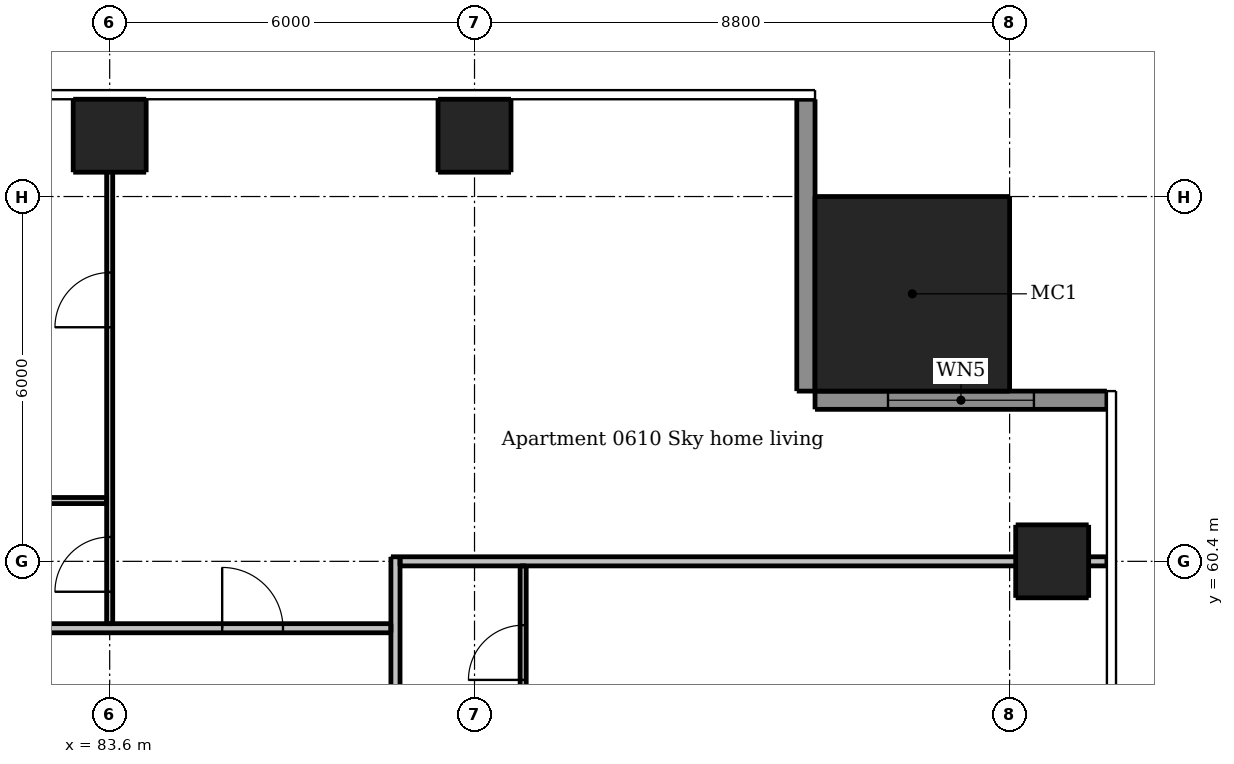
"""IFC4 building model, lengths in metres.
Left out: names, types, materials, properties, quantities, classifications, styles, units other than length and angle.
Written with IfcOpenShell. Run it as: python <this file> out.ifc"""

import sys

from ifc_helpers import new_model, si_unit, direction, frame, frame_2d, origin, origin_2d, place, context, subcontext, project, spatial, rectangle, extrude, element, fill, save


model = new_model("IFC4")
c1 = context("Model", 3, precision=1e-05, world=origin(), true_north=direction((0.0, 1.0)))
c2 = subcontext(c1, "Body", "Model", "MODEL_VIEW")
j1 = project(units=[si_unit("LENGTHUNIT", "METRE"), si_unit("PLANEANGLEUNIT", "RADIAN")], contexts=[c1])
p1 = place(None, origin())
s1 = spatial("IfcSite", under=j1, at=p1, CompositionType="ELEMENT")
p2 = place(p1, origin())
s2 = spatial("IfcBuilding", under=s1, at=p2, CompositionType="ELEMENT")
p3 = place(p2, frame((0.0, 0.0, 26.8)))
s3 = spatial("IfcBuildingStorey", under=s2, at=p3, CompositionType="ELEMENT", Elevation=26.8)
for number, where, z_axis, x_axis in (
    (1, (99.1, 60.4, 0.0), (0.0, 0.0, 1.0), (1.0, 0.0, 0.0)),
    (2, (83.6, 67.4, 0.0), (0.0, 0.0, 1.0), (1.0, 0.0, 0.0)),
    (3, (89.6, 67.4, 0.0), (0.0, 0.0, 1.0), (1.0, 0.0, 0.0)),
):
    element("IfcColumn", number, at=place(p3, frame(where, z_axis=z_axis, x_axis=x_axis)), inside=s3, PredefinedType="COLUMN", context=c2, shape_type="SweptSolid", body=[
        extrude(rectangle(XDim=1.2, YDim=1.2, at=origin_2d()), origin(), (0.0, 0.0, 1.0), 3.05),
    ])
p4 = place(p3, frame((96.8, 64.8, 0.0), z_axis=(0.0, 0.0, 1.0), x_axis=(1.0, 0.0, 0.0)))
e4 = element("IfcColumn", 4, at=p4, inside=s3, PredefinedType="COLUMN", context=c2, shape_type="SweptSolid", body=[
    extrude(rectangle(XDim=3.2, YDim=3.2, at=origin_2d()), origin(), (0.0, 0.0, 1.0), 3.3),
])
p5 = place(p3, frame((100.0, 63.05, 0.0), z_axis=(0.0, 0.0, 1.0), x_axis=(-1.0, 0.0, 0.0)))
e5 = element("IfcWall", 5, at=p5, inside=s3, PredefinedType="SOLIDWALL", context=c2, shape_type="SweptSolid", body=[
    extrude(rectangle(XDim=4.8, YDim=0.3, at=frame_2d((2.4, 0.0))), origin(), (0.0, 0.0, 1.0), 3.05),
])
p6 = place(p5, frame((1.2, 0.0, 0.15)))
e6 = element("IfcOpeningElement", 6, at=p6, cuts=e5, PredefinedType="OPENING", context=c2, shape_type="SweptSolid", body=[
    extrude(rectangle(XDim=2.4, YDim=2.1, at=frame_2d((1.2, 1.05))), frame((0.0, 0.16, 0.0), z_axis=(0.0, -1.0, 0.0), x_axis=(1.0, 0.0, 0.0)), (0.0, 0.0, 1.0), 0.32),
])
p7 = place(p3, frame((95.05, 63.2, 0.0), z_axis=(0.0, 0.0, 1.0), x_axis=(0.0, 1.0, 0.0)))
e7 = element("IfcWall", 7, at=p7, inside=s3, PredefinedType="SOLIDWALL", context=c2, shape_type="SweptSolid", body=[
    extrude(rectangle(XDim=4.8, YDim=0.3, at=frame_2d((2.4, 0.0))), origin(), (0.0, 0.0, 1.0), 3.05),
])
p8 = place(p3, frame((83.6, 59.375, 0.0), z_axis=(0.0, 0.0, 1.0), x_axis=(0.0, 1.0, 0.0)))
e8 = element("IfcWall", 8, at=p8, inside=s3, PredefinedType="PARTITIONING", context=c2, shape_type="SweptSolid", body=[
    extrude(rectangle(XDim=8.625, YDim=0.1, at=frame_2d((4.312, 0.0))), origin(), (0.0, 0.0, 1.0), 2.516),
])
p9 = place(p8, frame((0.525, 0.0, 0.0)))
e9 = element("IfcOpeningElement", 9, at=p9, cuts=e8, PredefinedType="OPENING", context=c2, shape_type="SweptSolid", body=[
    extrude(rectangle(XDim=0.9, YDim=2.1, at=frame_2d((0.45, 1.05))), frame((0.0, 0.06, 0.0), z_axis=(0.0, -1.0, 0.0), x_axis=(1.0, 0.0, 0.0)), (0.0, 0.0, 1.0), 0.12),
])
p10 = place(p8, frame((4.875, 0.0, 0.0)))
e10 = element("IfcOpeningElement", 10, at=p10, cuts=e8, PredefinedType="OPENING", context=c2, shape_type="SweptSolid", body=[
    extrude(rectangle(XDim=0.9, YDim=2.1, at=frame_2d((0.45, 1.05))), frame((0.0, 0.06, 0.0), z_axis=(0.0, -1.0, 0.0), x_axis=(1.0, 0.0, 0.0)), (0.0, 0.0, 1.0), 0.12),
])
p11 = place(p3, frame((90.4, 57.35, 0.0), z_axis=(0.0, 0.0, 1.0), x_axis=(0.0, 1.0, 0.0)))
e11 = element("IfcWall", 11, at=p11, inside=s3, PredefinedType="PARTITIONING", context=c2, shape_type="SweptSolid", body=[
    extrude(rectangle(XDim=2.975, YDim=0.1, at=frame_2d((1.487, 0.0))), origin(), (0.0, 0.0, 1.0), 3.05),
])
p12 = place(p11, frame((1.1, 0.0, 0.0)))
e12 = element("IfcOpeningElement", 12, at=p12, cuts=e11, PredefinedType="OPENING", context=c2, shape_type="SweptSolid", body=[
    extrude(rectangle(XDim=0.9, YDim=2.1, at=frame_2d((0.45, 1.05))), frame((0.0, 0.06, 0.0), z_axis=(0.0, -1.0, 0.0), x_axis=(1.0, 0.0, 0.0)), (0.0, 0.0, 1.0), 0.12),
])
p13 = place(p3, frame((83.55, 61.4, 0.0), z_axis=(0.0, 0.0, 1.0), x_axis=(-1.0, 0.0, 0.0)))
e13 = element("IfcWall", 13, at=p13, inside=s3, PredefinedType="PARTITIONING", context=c2, shape_type="SweptSolid", body=[
    extrude(rectangle(XDim=8.0, YDim=0.1, at=frame_2d((4.0, 0.0))), origin(), (0.0, 0.0, 1.0), 3.05),
])
p14 = place(p13, frame((6.6, 0.0, 0.0)))
e14 = element("IfcOpeningElement", 14, at=p14, cuts=e13, PredefinedType="OPENING", context=c2, shape_type="SweptSolid", body=[
    extrude(rectangle(XDim=0.8, YDim=2.1, at=frame_2d((0.4, 1.05))), frame((0.0, 0.06, 0.0), z_axis=(0.0, -1.0, 0.0), x_axis=(1.0, 0.0, 0.0)), (0.0, 0.0, 1.0), 0.12),
])
p15 = place(p13, frame((3.75, 0.0, 0.0)))
e15 = element("IfcOpeningElement", 15, at=p15, cuts=e13, PredefinedType="OPENING", context=c2, shape_type="SweptSolid", body=[
    extrude(rectangle(XDim=0.8, YDim=2.1, at=frame_2d((0.4, 1.05))), frame((0.0, 0.06, 0.0), z_axis=(0.0, -1.0, 0.0), x_axis=(1.0, 0.0, 0.0)), (0.0, 0.0, 1.0), 0.12),
])
p16 = place(p3, frame((88.3, 60.475, 0.0), z_axis=(0.0, 0.0, 1.0), x_axis=(0.0, -1.0, 0.0)))
e16 = element("IfcWall", 16, at=p16, inside=s3, PredefinedType="PARTITIONING", context=c2, shape_type="SweptSolid", body=[
    extrude(rectangle(XDim=28.7, YDim=0.15, at=frame_2d((14.35, 0.0))), origin(), (0.0, 0.0, 1.0), 3.05),
])
p17 = place(p16, frame((27.425, 0.0, 0.0)))
e17 = element("IfcOpeningElement", 17, at=p17, cuts=e16, PredefinedType="OPENING", context=c2, shape_type="SweptSolid", body=[
    extrude(rectangle(XDim=1.0, YDim=2.1, at=frame_2d((0.5, 1.05))), frame((0.0, 0.085, 0.0), z_axis=(0.0, -1.0, 0.0), x_axis=(1.0, 0.0, 0.0)), (0.0, 0.0, 1.0), 0.17),
])
p18 = place(p16, frame((16.325, 0.0, 0.0)))
e18 = element("IfcOpeningElement", 18, at=p18, cuts=e16, PredefinedType="OPENING", context=c2, shape_type="SweptSolid", body=[
    extrude(rectangle(XDim=1.0, YDim=2.1, at=frame_2d((0.5, 1.05))), frame((0.0, 0.085, 0.0), z_axis=(0.0, -1.0, 0.0), x_axis=(1.0, 0.0, 0.0)), (0.0, 0.0, 1.0), 0.17),
])
p19 = place(p16, frame((5.525, 0.0, 0.0)))
e19 = element("IfcOpeningElement", 19, at=p19, cuts=e16, PredefinedType="OPENING", context=c2, shape_type="SweptSolid", body=[
    extrude(rectangle(XDim=1.0, YDim=2.1, at=frame_2d((0.5, 1.05))), frame((0.0, 0.085, 0.0), z_axis=(0.0, -1.0, 0.0), x_axis=(1.0, 0.0, 0.0)), (0.0, 0.0, 1.0), 0.17),
])
p20 = place(p3, frame((88.375, 60.4, 0.0), z_axis=(0.0, 0.0, 1.0), x_axis=(1.0, 0.0, 0.0)))
e20 = element("IfcWall", 20, at=p20, inside=s3, PredefinedType="PARTITIONING", context=c2, shape_type="SweptSolid", body=[
    extrude(rectangle(XDim=11.625, YDim=0.15, at=frame_2d((5.812, 0.0))), origin(), (0.0, 0.0, 1.0), 2.516),
])
p21 = place(p3, frame((59.675, 59.3, 0.0), z_axis=(0.0, 0.0, 1.0), x_axis=(1.0, 0.0, 0.0)))
e21 = element("IfcWall", 21, at=p21, inside=s3, PredefinedType="PARTITIONING", context=c2, shape_type="SweptSolid", body=[
    extrude(rectangle(XDim=28.55, YDim=0.15, at=frame_2d((14.275, 0.0))), origin(), (0.0, 0.0, 1.0), 3.05),
])
p22 = place(p21, frame((2.425, 0.0, 0.0)))
e22 = element("IfcOpeningElement", 22, at=p22, cuts=e21, PredefinedType="OPENING", context=c2, shape_type="SweptSolid", body=[
    extrude(rectangle(XDim=1.0, YDim=2.1, at=frame_2d((0.5, 1.05))), frame((0.0, 0.085, 0.0), z_axis=(0.0, -1.0, 0.0), x_axis=(1.0, 0.0, 0.0)), (0.0, 0.0, 1.0), 0.17),
])
p23 = place(p21, frame((8.425, 0.0, 0.0)))
e23 = element("IfcOpeningElement", 23, at=p23, cuts=e21, PredefinedType="OPENING", context=c2, shape_type="SweptSolid", body=[
    extrude(rectangle(XDim=1.0, YDim=2.1, at=frame_2d((0.5, 1.05))), frame((0.0, 0.085, 0.0), z_axis=(0.0, -1.0, 0.0), x_axis=(1.0, 0.0, 0.0)), (0.0, 0.0, 1.0), 0.17),
])
p24 = place(p21, frame((14.425, 0.0, 0.0)))
e24 = element("IfcOpeningElement", 24, at=p24, cuts=e21, PredefinedType="OPENING", context=c2, shape_type="SweptSolid", body=[
    extrude(rectangle(XDim=1.0, YDim=2.1, at=frame_2d((0.5, 1.05))), frame((0.0, 0.085, 0.0), z_axis=(0.0, -1.0, 0.0), x_axis=(1.0, 0.0, 0.0)), (0.0, 0.0, 1.0), 0.17),
])
p25 = place(p21, frame((25.775, 0.0, 0.0)))
e25 = element("IfcOpeningElement", 25, at=p25, cuts=e21, PredefinedType="OPENING", context=c2, shape_type="SweptSolid", body=[
    extrude(rectangle(XDim=1.0, YDim=2.1, at=frame_2d((0.5, 1.05))), frame((0.0, 0.085, 0.0), z_axis=(0.0, -1.0, 0.0), x_axis=(1.0, 0.0, 0.0)), (0.0, 0.0, 1.0), 0.17),
])
p26 = place(p6, origin())
e26 = element("IfcWindow", 26, at=p26, inside=s3, PartitioningType="DOUBLE_PANEL_VERTICAL", PredefinedType="WINDOW", context=c2, shape_type="SweptSolid", body=[
    extrude(rectangle(XDim=2.4, YDim=2.1, at=frame_2d((1.2, 1.05))), frame((0.0, 0.03, 0.0), z_axis=(0.0, -1.0, 0.0), x_axis=(1.0, 0.0, 0.0)), (0.0, 0.0, 1.0), 0.06),
])
fill(e6, e26)
p27 = place(p12, origin())
e27 = element("IfcDoor", 27, at=p27, inside=s3, OperationType="SINGLE_SWING_LEFT", PredefinedType="DOOR", context=c2, shape_type="SweptSolid", body=[
    extrude(rectangle(XDim=0.9, YDim=2.1, at=frame_2d((0.45, 1.05))), frame((0.0, 0.025, 0.0), z_axis=(0.0, -1.0, 0.0), x_axis=(1.0, 0.0, 0.0)), (0.0, 0.0, 1.0), 0.05),
])
fill(e12, e27)
p28 = place(p25, origin())
e28 = element("IfcDoor", 28, at=p28, inside=s3, OperationType="SINGLE_SWING_LEFT", PredefinedType="DOOR", context=c2, shape_type="SweptSolid", body=[
    extrude(rectangle(XDim=1.0, YDim=2.1, at=frame_2d((0.5, 1.05))), frame((0.0, 0.025, 0.0), z_axis=(0.0, -1.0, 0.0), x_axis=(1.0, 0.0, 0.0)), (0.0, 0.0, 1.0), 0.05),
])
fill(e25, e28)
p29 = place(p9, origin())
e29 = element("IfcDoor", 29, at=p29, inside=s3, OperationType="SINGLE_SWING_LEFT", PredefinedType="DOOR", context=c2, shape_type="SweptSolid", body=[
    extrude(rectangle(XDim=0.9, YDim=2.1, at=frame_2d((0.45, 1.05))), frame((0.0, 0.025, 0.0), z_axis=(0.0, -1.0, 0.0), x_axis=(1.0, 0.0, 0.0)), (0.0, 0.0, 1.0), 0.05),
])
fill(e9, e29)
p30 = place(p10, origin())
e30 = element("IfcDoor", 30, at=p30, inside=s3, OperationType="SINGLE_SWING_LEFT", PredefinedType="DOOR", context=c2, shape_type="SweptSolid", body=[
    extrude(rectangle(XDim=0.9, YDim=2.1, at=frame_2d((0.45, 1.05))), frame((0.0, 0.025, 0.0), z_axis=(0.0, -1.0, 0.0), x_axis=(1.0, 0.0, 0.0)), (0.0, 0.0, 1.0), 0.05),
])
fill(e10, e30)
save(model, sys.argv[1])
